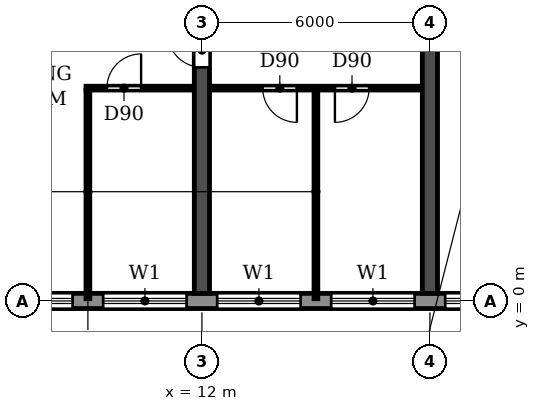
"""IFC4 building model, lengths in metres.
Left out: names, types, materials, properties, quantities, classifications, styles, units other than length and angle.
Written with IfcOpenShell. Run it as: python <this file> out.ifc"""

import sys

from ifc_helpers import new_model, si_unit, direction, frame, frame_2d, origin, place, context, subcontext, project, spatial, rectangle, extrude, element, fill, save


model = new_model("IFC4")
c1 = context("Model", 3, precision=1e-05, world=origin(), true_north=direction((0.0, 1.0)))
c2 = subcontext(c1, "Body", "Model", "MODEL_VIEW")
j1 = project(units=[si_unit("LENGTHUNIT", "METRE"), si_unit("PLANEANGLEUNIT", "RADIAN")], contexts=[c1])
p1 = place(None, origin())
s1 = spatial("IfcSite", under=j1, at=p1, CompositionType="ELEMENT")
p2 = place(p1, origin())
s2 = spatial("IfcBuilding", under=s1, at=p2, CompositionType="ELEMENT")
p3 = place(p2, frame((0.0, 0.0, 23.4)))
s3 = spatial("IfcBuildingStorey", under=s2, at=p3, CompositionType="ELEMENT", Elevation=23.4)
p4 = place(p3, frame((12.0, 0.2, 0.0), z_axis=(0.0, 0.0, 1.0), x_axis=(0.0, 1.0, 0.0)))
e1 = element("IfcWall", 1, at=p4, inside=s3, PredefinedType="SHEAR", context=c2, shape_type="SweptSolid", body=[
    extrude(rectangle(XDim=11.65, YDim=0.4, at=frame_2d((5.825, 0.0))), origin(), (0.0, 0.0, 1.0), 3.05),
])
p5 = place(p4, frame((5.95, 0.0, 0.0)))
e2 = element("IfcOpeningElement", 2, at=p5, cuts=e1, PredefinedType="OPENING", context=c2, shape_type="SweptSolid", body=[
    extrude(rectangle(XDim=0.9, YDim=2.1, at=frame_2d((0.45, 1.05))), frame((0.0, 0.21, 0.0), z_axis=(0.0, -1.0, 0.0), x_axis=(1.0, 0.0, 0.0)), (0.0, 0.0, 1.0), 0.42),
])
p6 = place(p3, frame((18.0, 0.2, 0.0), z_axis=(0.0, 0.0, 1.0), x_axis=(0.0, 1.0, 0.0)))
e3 = element("IfcWall", 3, at=p6, inside=s3, PredefinedType="SHEAR", context=c2, shape_type="SweptSolid", body=[
    extrude(rectangle(XDim=11.65, YDim=0.4, at=frame_2d((5.825, 0.0))), origin(), (0.0, 0.0, 1.0), 3.05),
])
p7 = place(p3, frame((4.683, 0.0, 0.0), z_axis=(0.0, 0.0, 1.0), x_axis=(1.0, 0.0, 0.0)))
e4 = element("IfcWall", 4, at=p7, inside=s3, PredefinedType="STANDARD", context=c2, shape_type="SweptSolid", body=[
    extrude(rectangle(XDim=92.634, YDim=0.4, at=frame_2d((46.317, 0.0))), origin(), (0.0, 0.0, 1.0), 3.05),
])
p8 = place(p7, frame((1.717, 0.0, 0.9)))
e5 = element("IfcOpeningElement", 5, at=p8, cuts=e4, PredefinedType="OPENING", context=c2, shape_type="SweptSolid", body=[
    extrude(rectangle(XDim=2.2, YDim=1.5, at=frame_2d((1.1, 0.75))), frame((0.0, 0.21, 0.0), z_axis=(0.0, -1.0, 0.0), x_axis=(1.0, 0.0, 0.0)), (0.0, 0.0, 1.0), 0.42),
])
p9 = place(p7, frame((4.717, 0.0, 0.9)))
e6 = element("IfcOpeningElement", 6, at=p9, cuts=e4, PredefinedType="OPENING", context=c2, shape_type="SweptSolid", body=[
    extrude(rectangle(XDim=2.2, YDim=1.5, at=frame_2d((1.1, 0.75))), frame((0.0, 0.21, 0.0), z_axis=(0.0, -1.0, 0.0), x_axis=(1.0, 0.0, 0.0)), (0.0, 0.0, 1.0), 0.42),
])
p10 = place(p7, frame((7.717, 0.0, 0.9)))
e7 = element("IfcOpeningElement", 7, at=p10, cuts=e4, PredefinedType="OPENING", context=c2, shape_type="SweptSolid", body=[
    extrude(rectangle(XDim=2.2, YDim=1.5, at=frame_2d((1.1, 0.75))), frame((0.0, 0.21, 0.0), z_axis=(0.0, -1.0, 0.0), x_axis=(1.0, 0.0, 0.0)), (0.0, 0.0, 1.0), 0.42),
])
p11 = place(p7, frame((10.717, 0.0, 0.9)))
e8 = element("IfcOpeningElement", 8, at=p11, cuts=e4, PredefinedType="OPENING", context=c2, shape_type="SweptSolid", body=[
    extrude(rectangle(XDim=2.2, YDim=1.5, at=frame_2d((1.1, 0.75))), frame((0.0, 0.21, 0.0), z_axis=(0.0, -1.0, 0.0), x_axis=(1.0, 0.0, 0.0)), (0.0, 0.0, 1.0), 0.42),
])
p12 = place(p7, frame((13.717, 0.0, 0.9)))
e9 = element("IfcOpeningElement", 9, at=p12, cuts=e4, PredefinedType="OPENING", context=c2, shape_type="SweptSolid", body=[
    extrude(rectangle(XDim=2.2, YDim=1.5, at=frame_2d((1.1, 0.75))), frame((0.0, 0.21, 0.0), z_axis=(0.0, -1.0, 0.0), x_axis=(1.0, 0.0, 0.0)), (0.0, 0.0, 1.0), 0.42),
])
p13 = place(p7, frame((16.717, 0.0, 0.9)))
e10 = element("IfcOpeningElement", 10, at=p13, cuts=e4, PredefinedType="OPENING", context=c2, shape_type="SweptSolid", body=[
    extrude(rectangle(XDim=2.2, YDim=1.5, at=frame_2d((1.1, 0.75))), frame((0.0, 0.21, 0.0), z_axis=(0.0, -1.0, 0.0), x_axis=(1.0, 0.0, 0.0)), (0.0, 0.0, 1.0), 0.42),
])
p14 = place(p7, frame((19.917, 0.0, 0.0)))
e11 = element("IfcOpeningElement", 11, at=p14, cuts=e4, PredefinedType="OPENING", context=c2, shape_type="SweptSolid", body=[
    extrude(rectangle(XDim=1.8, YDim=2.4, at=frame_2d((0.9, 1.2))), frame((0.0, 0.21, 0.0), z_axis=(0.0, -1.0, 0.0), x_axis=(1.0, 0.0, 0.0)), (0.0, 0.0, 1.0), 0.42),
])
p15 = place(p7, frame((22.717, 0.0, 0.9)))
e12 = element("IfcOpeningElement", 12, at=p15, cuts=e4, PredefinedType="OPENING", context=c2, shape_type="SweptSolid", body=[
    extrude(rectangle(XDim=2.2, YDim=1.5, at=frame_2d((1.1, 0.75))), frame((0.0, 0.21, 0.0), z_axis=(0.0, -1.0, 0.0), x_axis=(1.0, 0.0, 0.0)), (0.0, 0.0, 1.0), 0.42),
])
p16 = place(p7, frame((25.717, 0.0, 0.9)))
e13 = element("IfcOpeningElement", 13, at=p16, cuts=e4, PredefinedType="OPENING", context=c2, shape_type="SweptSolid", body=[
    extrude(rectangle(XDim=2.2, YDim=1.5, at=frame_2d((1.1, 0.75))), frame((0.0, 0.21, 0.0), z_axis=(0.0, -1.0, 0.0), x_axis=(1.0, 0.0, 0.0)), (0.0, 0.0, 1.0), 0.42),
])
p17 = place(p7, frame((28.717, 0.0, 0.9)))
e14 = element("IfcOpeningElement", 14, at=p17, cuts=e4, PredefinedType="OPENING", context=c2, shape_type="SweptSolid", body=[
    extrude(rectangle(XDim=2.2, YDim=1.5, at=frame_2d((1.1, 0.75))), frame((0.0, 0.21, 0.0), z_axis=(0.0, -1.0, 0.0), x_axis=(1.0, 0.0, 0.0)), (0.0, 0.0, 1.0), 0.42),
])
p18 = place(p7, frame((31.917, 0.0, 0.0)))
e15 = element("IfcOpeningElement", 15, at=p18, cuts=e4, PredefinedType="OPENING", context=c2, shape_type="SweptSolid", body=[
    extrude(rectangle(XDim=1.8, YDim=2.4, at=frame_2d((0.9, 1.2))), frame((0.0, 0.21, 0.0), z_axis=(0.0, -1.0, 0.0), x_axis=(1.0, 0.0, 0.0)), (0.0, 0.0, 1.0), 0.42),
])
p19 = place(p7, frame((34.717, 0.0, 0.9)))
e16 = element("IfcOpeningElement", 16, at=p19, cuts=e4, PredefinedType="OPENING", context=c2, shape_type="SweptSolid", body=[
    extrude(rectangle(XDim=2.2, YDim=1.5, at=frame_2d((1.1, 0.75))), frame((0.0, 0.21, 0.0), z_axis=(0.0, -1.0, 0.0), x_axis=(1.0, 0.0, 0.0)), (0.0, 0.0, 1.0), 0.42),
])
p20 = place(p7, frame((37.717, 0.0, 0.9)))
e17 = element("IfcOpeningElement", 17, at=p20, cuts=e4, PredefinedType="OPENING", context=c2, shape_type="SweptSolid", body=[
    extrude(rectangle(XDim=2.2, YDim=1.5, at=frame_2d((1.1, 0.75))), frame((0.0, 0.21, 0.0), z_axis=(0.0, -1.0, 0.0), x_axis=(1.0, 0.0, 0.0)), (0.0, 0.0, 1.0), 0.42),
])
p21 = place(p7, frame((40.717, 0.0, 0.9)))
e18 = element("IfcOpeningElement", 18, at=p21, cuts=e4, PredefinedType="OPENING", context=c2, shape_type="SweptSolid", body=[
    extrude(rectangle(XDim=2.2, YDim=1.5, at=frame_2d((1.1, 0.75))), frame((0.0, 0.21, 0.0), z_axis=(0.0, -1.0, 0.0), x_axis=(1.0, 0.0, 0.0)), (0.0, 0.0, 1.0), 0.42),
])
p22 = place(p7, frame((43.917, 0.0, 0.0)))
e19 = element("IfcOpeningElement", 19, at=p22, cuts=e4, PredefinedType="OPENING", context=c2, shape_type="SweptSolid", body=[
    extrude(rectangle(XDim=1.8, YDim=2.4, at=frame_2d((0.9, 1.2))), frame((0.0, 0.21, 0.0), z_axis=(0.0, -1.0, 0.0), x_axis=(1.0, 0.0, 0.0)), (0.0, 0.0, 1.0), 0.42),
])
p23 = place(p7, frame((46.717, 0.0, 0.9)))
e20 = element("IfcOpeningElement", 20, at=p23, cuts=e4, PredefinedType="OPENING", context=c2, shape_type="SweptSolid", body=[
    extrude(rectangle(XDim=2.2, YDim=1.5, at=frame_2d((1.1, 0.75))), frame((0.0, 0.21, 0.0), z_axis=(0.0, -1.0, 0.0), x_axis=(1.0, 0.0, 0.0)), (0.0, 0.0, 1.0), 0.42),
])
p24 = place(p7, frame((49.717, 0.0, 0.9)))
e21 = element("IfcOpeningElement", 21, at=p24, cuts=e4, PredefinedType="OPENING", context=c2, shape_type="SweptSolid", body=[
    extrude(rectangle(XDim=2.2, YDim=1.5, at=frame_2d((1.1, 0.75))), frame((0.0, 0.21, 0.0), z_axis=(0.0, -1.0, 0.0), x_axis=(1.0, 0.0, 0.0)), (0.0, 0.0, 1.0), 0.42),
])
p25 = place(p7, frame((52.717, 0.0, 0.9)))
e22 = element("IfcOpeningElement", 22, at=p25, cuts=e4, PredefinedType="OPENING", context=c2, shape_type="SweptSolid", body=[
    extrude(rectangle(XDim=2.2, YDim=1.5, at=frame_2d((1.1, 0.75))), frame((0.0, 0.21, 0.0), z_axis=(0.0, -1.0, 0.0), x_axis=(1.0, 0.0, 0.0)), (0.0, 0.0, 1.0), 0.42),
])
p26 = place(p7, frame((55.717, 0.0, 0.9)))
e23 = element("IfcOpeningElement", 23, at=p26, cuts=e4, PredefinedType="OPENING", context=c2, shape_type="SweptSolid", body=[
    extrude(rectangle(XDim=2.2, YDim=1.5, at=frame_2d((1.1, 0.75))), frame((0.0, 0.21, 0.0), z_axis=(0.0, -1.0, 0.0), x_axis=(1.0, 0.0, 0.0)), (0.0, 0.0, 1.0), 0.42),
])
p27 = place(p7, frame((58.917, 0.0, 0.0)))
e24 = element("IfcOpeningElement", 24, at=p27, cuts=e4, PredefinedType="OPENING", context=c2, shape_type="SweptSolid", body=[
    extrude(rectangle(XDim=1.8, YDim=2.4, at=frame_2d((0.9, 1.2))), frame((0.0, 0.21, 0.0), z_axis=(0.0, -1.0, 0.0), x_axis=(1.0, 0.0, 0.0)), (0.0, 0.0, 1.0), 0.42),
])
p28 = place(p7, frame((61.717, 0.0, 0.9)))
e25 = element("IfcOpeningElement", 25, at=p28, cuts=e4, PredefinedType="OPENING", context=c2, shape_type="SweptSolid", body=[
    extrude(rectangle(XDim=2.2, YDim=1.5, at=frame_2d((1.1, 0.75))), frame((0.0, 0.21, 0.0), z_axis=(0.0, -1.0, 0.0), x_axis=(1.0, 0.0, 0.0)), (0.0, 0.0, 1.0), 0.42),
])
p29 = place(p7, frame((64.717, 0.0, 0.9)))
e26 = element("IfcOpeningElement", 26, at=p29, cuts=e4, PredefinedType="OPENING", context=c2, shape_type="SweptSolid", body=[
    extrude(rectangle(XDim=2.2, YDim=1.5, at=frame_2d((1.1, 0.75))), frame((0.0, 0.21, 0.0), z_axis=(0.0, -1.0, 0.0), x_axis=(1.0, 0.0, 0.0)), (0.0, 0.0, 1.0), 0.42),
])
p30 = place(p7, frame((67.717, 0.0, 0.9)))
e27 = element("IfcOpeningElement", 27, at=p30, cuts=e4, PredefinedType="OPENING", context=c2, shape_type="SweptSolid", body=[
    extrude(rectangle(XDim=2.2, YDim=1.5, at=frame_2d((1.1, 0.75))), frame((0.0, 0.21, 0.0), z_axis=(0.0, -1.0, 0.0), x_axis=(1.0, 0.0, 0.0)), (0.0, 0.0, 1.0), 0.42),
])
p31 = place(p7, frame((70.917, 0.0, 0.0)))
e28 = element("IfcOpeningElement", 28, at=p31, cuts=e4, PredefinedType="OPENING", context=c2, shape_type="SweptSolid", body=[
    extrude(rectangle(XDim=1.8, YDim=2.4, at=frame_2d((0.9, 1.2))), frame((0.0, 0.21, 0.0), z_axis=(0.0, -1.0, 0.0), x_axis=(1.0, 0.0, 0.0)), (0.0, 0.0, 1.0), 0.42),
])
p32 = place(p7, frame((73.717, 0.0, 0.9)))
e29 = element("IfcOpeningElement", 29, at=p32, cuts=e4, PredefinedType="OPENING", context=c2, shape_type="SweptSolid", body=[
    extrude(rectangle(XDim=2.2, YDim=1.5, at=frame_2d((1.1, 0.75))), frame((0.0, 0.21, 0.0), z_axis=(0.0, -1.0, 0.0), x_axis=(1.0, 0.0, 0.0)), (0.0, 0.0, 1.0), 0.42),
])
p33 = place(p7, frame((76.717, 0.0, 0.9)))
e30 = element("IfcOpeningElement", 30, at=p33, cuts=e4, PredefinedType="OPENING", context=c2, shape_type="SweptSolid", body=[
    extrude(rectangle(XDim=2.2, YDim=1.5, at=frame_2d((1.1, 0.75))), frame((0.0, 0.21, 0.0), z_axis=(0.0, -1.0, 0.0), x_axis=(1.0, 0.0, 0.0)), (0.0, 0.0, 1.0), 0.42),
])
p34 = place(p7, frame((79.717, 0.0, 0.9)))
e31 = element("IfcOpeningElement", 31, at=p34, cuts=e4, PredefinedType="OPENING", context=c2, shape_type="SweptSolid", body=[
    extrude(rectangle(XDim=2.2, YDim=1.5, at=frame_2d((1.1, 0.75))), frame((0.0, 0.21, 0.0), z_axis=(0.0, -1.0, 0.0), x_axis=(1.0, 0.0, 0.0)), (0.0, 0.0, 1.0), 0.42),
])
p35 = place(p7, frame((82.717, 0.0, 0.9)))
e32 = element("IfcOpeningElement", 32, at=p35, cuts=e4, PredefinedType="OPENING", context=c2, shape_type="SweptSolid", body=[
    extrude(rectangle(XDim=2.2, YDim=1.5, at=frame_2d((1.1, 0.75))), frame((0.0, 0.21, 0.0), z_axis=(0.0, -1.0, 0.0), x_axis=(1.0, 0.0, 0.0)), (0.0, 0.0, 1.0), 0.42),
])
p36 = place(p7, frame((85.717, 0.0, 0.9)))
e33 = element("IfcOpeningElement", 33, at=p36, cuts=e4, PredefinedType="OPENING", context=c2, shape_type="SweptSolid", body=[
    extrude(rectangle(XDim=2.2, YDim=1.5, at=frame_2d((1.1, 0.75))), frame((0.0, 0.21, 0.0), z_axis=(0.0, -1.0, 0.0), x_axis=(1.0, 0.0, 0.0)), (0.0, 0.0, 1.0), 0.42),
])
p37 = place(p7, frame((88.717, 0.0, 0.9)))
e34 = element("IfcOpeningElement", 34, at=p37, cuts=e4, PredefinedType="OPENING", context=c2, shape_type="SweptSolid", body=[
    extrude(rectangle(XDim=2.2, YDim=1.5, at=frame_2d((1.1, 0.75))), frame((0.0, 0.21, 0.0), z_axis=(0.0, -1.0, 0.0), x_axis=(1.0, 0.0, 0.0)), (0.0, 0.0, 1.0), 0.42),
])
p38 = place(p3, frame((8.95, 5.6, 0.0), z_axis=(0.0, 0.0, 1.0), x_axis=(1.0, 0.0, 0.0)))
e35 = element("IfcWall", 35, at=p38, inside=s3, PredefinedType="PARTITIONING", context=c2, shape_type="SweptSolid", body=[
    extrude(rectangle(XDim=2.84, YDim=0.1, at=frame_2d((1.42, 0.0))), origin(), (0.0, 0.0, 1.0), 3.05),
])
p39 = place(p38, frame((0.55, 0.0, 0.0)))
e36 = element("IfcOpeningElement", 36, at=p39, cuts=e35, PredefinedType="OPENING", context=c2, shape_type="SweptSolid", body=[
    extrude(rectangle(XDim=0.9, YDim=2.1, at=frame_2d((0.45, 1.05))), frame((0.0, 0.06, 0.0), z_axis=(0.0, -1.0, 0.0), x_axis=(1.0, 0.0, 0.0)), (0.0, 0.0, 1.0), 0.12),
])
p40 = place(p3, frame((12.21, 5.6, 0.0), z_axis=(0.0, 0.0, 1.0), x_axis=(1.0, 0.0, 0.0)))
e37 = element("IfcWall", 37, at=p40, inside=s3, PredefinedType="PARTITIONING", context=c2, shape_type="SweptSolid", body=[
    extrude(rectangle(XDim=5.58, YDim=0.1, at=frame_2d((2.79, 0.0))), origin(), (0.0, 0.0, 1.0), 3.05),
])
p41 = place(p40, frame((1.39, 0.0, 0.0)))
e38 = element("IfcOpeningElement", 38, at=p41, cuts=e37, PredefinedType="OPENING", context=c2, shape_type="SweptSolid", body=[
    extrude(rectangle(XDim=0.9, YDim=2.1, at=frame_2d((0.45, 1.05))), frame((0.0, 0.06, 0.0), z_axis=(0.0, -1.0, 0.0), x_axis=(1.0, 0.0, 0.0)), (0.0, 0.0, 1.0), 0.12),
])
p42 = place(p40, frame((3.29, 0.0, 0.0)))
e39 = element("IfcOpeningElement", 39, at=p42, cuts=e37, PredefinedType="OPENING", context=c2, shape_type="SweptSolid", body=[
    extrude(rectangle(XDim=0.9, YDim=2.1, at=frame_2d((0.45, 1.05))), frame((0.0, 0.06, 0.0), z_axis=(0.0, -1.0, 0.0), x_axis=(1.0, 0.0, 0.0)), (0.0, 0.0, 1.0), 0.12),
])
for number, where, z_axis, x_axis in (
    (40, (9.0, 0.06, 0.0), (0.0, 0.0, 1.0), (0.0, 1.0, 0.0)),
    (41, (15.0, 0.06, 0.0), (0.0, 0.0, 1.0), (0.0, 1.0, 0.0)),
):
    element("IfcWall", number, at=place(p3, frame(where, z_axis=z_axis, x_axis=x_axis)), inside=s3, PredefinedType="PARTITIONING", context=c2, shape_type="SweptSolid", body=[
        extrude(rectangle(XDim=5.49, YDim=0.1, at=frame_2d((2.745, 0.0))), origin(), (0.0, 0.0, 1.0), 3.05),
    ])
p43 = place(p8, origin())
e42 = element("IfcWindow", 42, at=p43, inside=s3, PartitioningType="DOUBLE_PANEL_HORIZONTAL", PredefinedType="WINDOW", context=c2, shape_type="SweptSolid", body=[
    extrude(rectangle(XDim=2.2, YDim=1.5, at=frame_2d((1.1, 0.75))), frame((0.0, 0.03, 0.0), z_axis=(0.0, -1.0, 0.0), x_axis=(1.0, 0.0, 0.0)), (0.0, 0.0, 1.0), 0.06),
])
fill(e5, e42)
p44 = place(p9, origin())
e43 = element("IfcWindow", 43, at=p44, inside=s3, PartitioningType="DOUBLE_PANEL_HORIZONTAL", PredefinedType="WINDOW", context=c2, shape_type="SweptSolid", body=[
    extrude(rectangle(XDim=2.2, YDim=1.5, at=frame_2d((1.1, 0.75))), frame((0.0, 0.03, 0.0), z_axis=(0.0, -1.0, 0.0), x_axis=(1.0, 0.0, 0.0)), (0.0, 0.0, 1.0), 0.06),
])
fill(e6, e43)
p45 = place(p10, origin())
e44 = element("IfcWindow", 44, at=p45, inside=s3, PartitioningType="DOUBLE_PANEL_HORIZONTAL", PredefinedType="WINDOW", context=c2, shape_type="SweptSolid", body=[
    extrude(rectangle(XDim=2.2, YDim=1.5, at=frame_2d((1.1, 0.75))), frame((0.0, 0.03, 0.0), z_axis=(0.0, -1.0, 0.0), x_axis=(1.0, 0.0, 0.0)), (0.0, 0.0, 1.0), 0.06),
])
fill(e7, e44)
p46 = place(p11, origin())
e45 = element("IfcWindow", 45, at=p46, inside=s3, PartitioningType="DOUBLE_PANEL_HORIZONTAL", PredefinedType="WINDOW", context=c2, shape_type="SweptSolid", body=[
    extrude(rectangle(XDim=2.2, YDim=1.5, at=frame_2d((1.1, 0.75))), frame((0.0, 0.03, 0.0), z_axis=(0.0, -1.0, 0.0), x_axis=(1.0, 0.0, 0.0)), (0.0, 0.0, 1.0), 0.06),
])
fill(e8, e45)
p47 = place(p12, origin())
e46 = element("IfcWindow", 46, at=p47, inside=s3, PartitioningType="DOUBLE_PANEL_HORIZONTAL", PredefinedType="WINDOW", context=c2, shape_type="SweptSolid", body=[
    extrude(rectangle(XDim=2.2, YDim=1.5, at=frame_2d((1.1, 0.75))), frame((0.0, 0.03, 0.0), z_axis=(0.0, -1.0, 0.0), x_axis=(1.0, 0.0, 0.0)), (0.0, 0.0, 1.0), 0.06),
])
fill(e9, e46)
p48 = place(p41, frame((0.9, 0.0, 0.0), z_axis=(0.0, 0.0, 1.0), x_axis=(-1.0, 0.0, 0.0)))
e47 = element("IfcDoor", 47, at=p48, inside=s3, OperationType="SINGLE_SWING_LEFT", PredefinedType="DOOR", context=c2, shape_type="SweptSolid", body=[
    extrude(rectangle(XDim=0.9, YDim=2.1, at=frame_2d((0.45, 1.05))), frame((0.0, 0.025, 0.0), z_axis=(0.0, -1.0, 0.0), x_axis=(1.0, 0.0, 0.0)), (0.0, 0.0, 1.0), 0.05),
])
fill(e38, e47)
p49 = place(p42, frame((0.9, 0.0, 0.0), z_axis=(0.0, 0.0, 1.0), x_axis=(-1.0, 0.0, 0.0)))
e48 = element("IfcDoor", 48, at=p49, inside=s3, OperationType="SINGLE_SWING_RIGHT", PredefinedType="DOOR", context=c2, shape_type="SweptSolid", body=[
    extrude(rectangle(XDim=0.9, YDim=2.1, at=frame_2d((0.45, 1.05))), frame((0.0, 0.025, 0.0), z_axis=(0.0, -1.0, 0.0), x_axis=(1.0, 0.0, 0.0)), (0.0, 0.0, 1.0), 0.05),
])
fill(e39, e48)
p50 = place(p39, origin())
e49 = element("IfcDoor", 49, at=p50, inside=s3, OperationType="SINGLE_SWING_RIGHT", PredefinedType="DOOR", context=c2, shape_type="SweptSolid", body=[
    extrude(rectangle(XDim=0.9, YDim=2.1, at=frame_2d((0.45, 1.05))), frame((0.0, 0.025, 0.0), z_axis=(0.0, -1.0, 0.0), x_axis=(1.0, 0.0, 0.0)), (0.0, 0.0, 1.0), 0.05),
])
fill(e36, e49)
p51 = place(p5, origin())
e50 = element("IfcDoor", 50, at=p51, inside=s3, OperationType="SINGLE_SWING_RIGHT", PredefinedType="DOOR", context=c2, shape_type="SweptSolid", body=[
    extrude(rectangle(XDim=0.9, YDim=2.1, at=frame_2d((0.45, 1.05))), frame((0.0, 0.025, 0.0), z_axis=(0.0, -1.0, 0.0), x_axis=(1.0, 0.0, 0.0)), (0.0, 0.0, 1.0), 0.05),
])
fill(e2, e50)
save(model, sys.argv[1])
